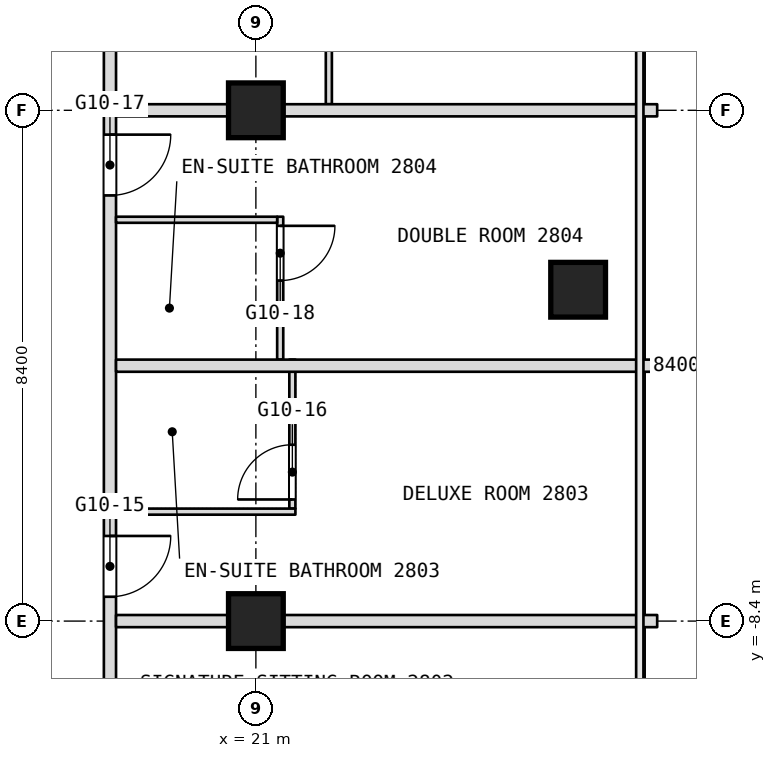
"""IFC4 building model, lengths in metres.
Left out: names, types, materials, properties, quantities, classifications, styles, units other than length and angle.
Written with IfcOpenShell. Run it as: python <this file> out.ifc"""

import sys

from ifc_helpers import new_model, si_unit, direction, frame, frame_2d, origin, origin_2d, place, context, subcontext, project, spatial, rectangle, extrude, element, fill, save


model = new_model("IFC4")
c1 = context("Model", 3, precision=1e-05, world=origin(), true_north=direction((0.0, 1.0)))
c2 = subcontext(c1, "Body", "Model", "MODEL_VIEW")
j1 = project(units=[si_unit("LENGTHUNIT", "METRE"), si_unit("PLANEANGLEUNIT", "RADIAN")], contexts=[c1])
p1 = place(None, origin())
s1 = spatial("IfcSite", under=j1, at=p1, CompositionType="ELEMENT")
p2 = place(p1, origin())
s2 = spatial("IfcBuilding", under=s1, at=p2, CompositionType="ELEMENT")
p3 = place(p2, frame((0.0, 0.0, 126.5)))
s3 = spatial("IfcBuildingStorey", under=s2, at=p3, CompositionType="ELEMENT", Elevation=126.5)
for number, where, z_axis, x_axis in (
    (1, (21.0, -8.4, 0.0), (0.0, 0.0, 1.0), (1.0, 0.0, 0.0)),
    (2, (21.0, 0.0, 0.0), (0.0, 0.0, 1.0), (1.0, 0.0, 0.0)),
    (3, (26.3, -2.951, 0.0), (0.0, 0.0, 1.0), (1.0, 0.0, 0.0)),
):
    element("IfcColumn", number, at=place(p3, frame(where, z_axis=z_axis, x_axis=x_axis)), inside=s3, PredefinedType="COLUMN", context=c2, shape_type="SweptSolid", body=[
        extrude(rectangle(XDim=0.9, YDim=0.9, at=origin_2d()), origin(), (0.0, 0.0, 1.0), 3.6),
    ])
p4 = place(p3, frame((22.2, 0.1, 0.0), z_axis=(0.0, 0.0, 1.0), x_axis=(0.0, 1.0, 0.0)))
e4 = element("IfcWall", 4, at=p4, inside=s3, PredefinedType="PARTITIONING", context=c2, shape_type="SweptSolid", body=[
    extrude(rectangle(XDim=3.55, YDim=0.1, at=frame_2d((1.775, 0.0))), origin(), (0.0, 0.0, 1.0), 3.34),
])
p5 = place(p4, frame((2.5, 0.0, 0.0)))
e5 = element("IfcOpeningElement", 5, at=p5, cuts=e4, PredefinedType="OPENING", context=c2, shape_type="SweptSolid", body=[
    extrude(rectangle(XDim=0.9, YDim=2.1, at=frame_2d((0.45, 1.05))), frame((0.0, 0.05, 0.0), z_axis=(0.0, -1.0, 0.0), x_axis=(1.0, 0.0, 0.0)), (0.0, 0.0, 1.0), 0.1),
])
p6 = place(p3, frame((21.6, -6.55, 0.0), z_axis=(0.0, 0.0, 1.0), x_axis=(0.0, 1.0, 0.0)))
e6 = element("IfcWall", 6, at=p6, inside=s3, PredefinedType="PARTITIONING", context=c2, shape_type="SweptSolid", body=[
    extrude(rectangle(XDim=2.45, YDim=0.1, at=frame_2d((1.225, 0.0))), origin(), (0.0, 0.0, 1.0), 3.34),
])
p7 = place(p6, frame((0.15, 0.0, 0.0)))
e7 = element("IfcOpeningElement", 7, at=p7, cuts=e6, PredefinedType="OPENING", context=c2, shape_type="SweptSolid", body=[
    extrude(rectangle(XDim=0.9, YDim=2.1, at=frame_2d((0.45, 1.05))), frame((0.0, 0.05, 0.0), z_axis=(0.0, -1.0, 0.0), x_axis=(1.0, 0.0, 0.0)), (0.0, 0.0, 1.0), 0.1),
])
p8 = place(p3, frame((21.4, -4.1, 0.0), z_axis=(0.0, 0.0, 1.0), x_axis=(0.0, 1.0, 0.0)))
e8 = element("IfcWall", 8, at=p8, inside=s3, PredefinedType="PARTITIONING", context=c2, shape_type="SweptSolid", body=[
    extrude(rectangle(XDim=2.35, YDim=0.1, at=frame_2d((1.175, 0.0))), origin(), (0.0, 0.0, 1.0), 3.34),
])
p9 = place(p8, frame((1.3, 0.0, 0.0)))
e9 = element("IfcOpeningElement", 9, at=p9, cuts=e8, PredefinedType="OPENING", context=c2, shape_type="SweptSolid", body=[
    extrude(rectangle(XDim=0.9, YDim=2.1, at=frame_2d((0.45, 1.05))), frame((0.0, 0.05, 0.0), z_axis=(0.0, -1.0, 0.0), x_axis=(1.0, 0.0, 0.0)), (0.0, 0.0, 1.0), 0.1),
])
p10 = place(p3, frame((18.6, -21.708, 0.0), z_axis=(0.0, 0.0, 1.0), x_axis=(0.0, 1.0, 0.0)))
e10 = element("IfcWall", 10, at=p10, inside=s3, PredefinedType="PARTITIONING", context=c2, shape_type="SweptSolid", body=[
    extrude(rectangle(XDim=49.648, YDim=0.2, at=frame_2d((24.824, 0.0))), origin(), (0.0, 0.0, 1.0), 3.34),
])
p11 = place(p10, frame((2.204, 0.0, 0.0)))
e11 = element("IfcOpeningElement", 11, at=p11, cuts=e10, PredefinedType="OPENING", context=c2, shape_type="SweptSolid", body=[
    extrude(rectangle(XDim=0.9, YDim=2.1, at=frame_2d((0.45, 1.05))), frame((0.0, 0.1, 0.0), z_axis=(0.0, -1.0, 0.0), x_axis=(1.0, 0.0, 0.0)), (0.0, 0.0, 1.0), 0.2),
])
p12 = place(p10, frame((10.658, 0.0, 0.0)))
e12 = element("IfcOpeningElement", 12, at=p12, cuts=e10, PredefinedType="OPENING", context=c2, shape_type="SweptSolid", body=[
    extrude(rectangle(XDim=1.1, YDim=2.1, at=frame_2d((0.55, 1.05))), frame((0.0, 0.1, 0.0), z_axis=(0.0, -1.0, 0.0), x_axis=(1.0, 0.0, 0.0)), (0.0, 0.0, 1.0), 0.2),
])
p13 = place(p10, frame((13.708, 0.0, 0.0)))
e13 = element("IfcOpeningElement", 13, at=p13, cuts=e10, PredefinedType="OPENING", context=c2, shape_type="SweptSolid", body=[
    extrude(rectangle(XDim=1.0, YDim=2.1, at=frame_2d((0.5, 1.05))), frame((0.0, 0.1, 0.0), z_axis=(0.0, -1.0, 0.0), x_axis=(1.0, 0.0, 0.0)), (0.0, 0.0, 1.0), 0.2),
])
p14 = place(p10, frame((20.308, 0.0, 0.0)))
e14 = element("IfcOpeningElement", 14, at=p14, cuts=e10, PredefinedType="OPENING", context=c2, shape_type="SweptSolid", body=[
    extrude(rectangle(XDim=1.0, YDim=2.1, at=frame_2d((0.5, 1.05))), frame((0.0, 0.1, 0.0), z_axis=(0.0, -1.0, 0.0), x_axis=(1.0, 0.0, 0.0)), (0.0, 0.0, 1.0), 0.2),
])
p15 = place(p10, frame((25.408, 0.0, 0.0)))
e15 = element("IfcOpeningElement", 15, at=p15, cuts=e10, PredefinedType="OPENING", context=c2, shape_type="SweptSolid", body=[
    extrude(rectangle(XDim=1.1, YDim=2.1, at=frame_2d((0.55, 1.05))), frame((0.0, 0.1, 0.0), z_axis=(0.0, -1.0, 0.0), x_axis=(1.0, 0.0, 0.0)), (0.0, 0.0, 1.0), 0.2),
])
p16 = place(p10, frame((30.508, 0.0, 0.0)))
e16 = element("IfcOpeningElement", 16, at=p16, cuts=e10, PredefinedType="OPENING", context=c2, shape_type="SweptSolid", body=[
    extrude(rectangle(XDim=1.0, YDim=2.1, at=frame_2d((0.5, 1.05))), frame((0.0, 0.1, 0.0), z_axis=(0.0, -1.0, 0.0), x_axis=(1.0, 0.0, 0.0)), (0.0, 0.0, 1.0), 0.2),
])
p17 = place(p10, frame((37.108, 0.0, 0.0)))
e17 = element("IfcOpeningElement", 17, at=p17, cuts=e10, PredefinedType="OPENING", context=c2, shape_type="SweptSolid", body=[
    extrude(rectangle(XDim=1.0, YDim=2.1, at=frame_2d((0.5, 1.05))), frame((0.0, 0.1, 0.0), z_axis=(0.0, -1.0, 0.0), x_axis=(1.0, 0.0, 0.0)), (0.0, 0.0, 1.0), 0.2),
])
p18 = place(p10, frame((42.608, 0.0, 0.0)))
e18 = element("IfcOpeningElement", 18, at=p18, cuts=e10, PredefinedType="OPENING", context=c2, shape_type="SweptSolid", body=[
    extrude(rectangle(XDim=1.0, YDim=2.1, at=frame_2d((0.5, 1.05))), frame((0.0, 0.1, 0.0), z_axis=(0.0, -1.0, 0.0), x_axis=(1.0, 0.0, 0.0)), (0.0, 0.0, 1.0), 0.2),
])
p19 = place(p10, frame((44.608, 0.0, 0.0)))
e19 = element("IfcOpeningElement", 19, at=p19, cuts=e10, PredefinedType="OPENING", context=c2, shape_type="SweptSolid", body=[
    extrude(rectangle(XDim=1.0, YDim=2.1, at=frame_2d((0.5, 1.05))), frame((0.0, 0.1, 0.0), z_axis=(0.0, -1.0, 0.0), x_axis=(1.0, 0.0, 0.0)), (0.0, 0.0, 1.0), 0.2),
])
p20 = place(p3, frame((18.7, -8.4, 0.0), z_axis=(0.0, 0.0, 1.0), x_axis=(1.0, 0.0, 0.0)))
e20 = element("IfcWall", 20, at=p20, inside=s3, PredefinedType="PARTITIONING", context=c2, shape_type="SweptSolid", body=[
    extrude(rectangle(XDim=8.9, YDim=0.2, at=frame_2d((4.45, 0.0))), origin(), (0.0, 0.0, 1.0), 2.89),
])
p21 = place(p3, frame((18.7, -6.6, 0.0), z_axis=(0.0, 0.0, 1.0), x_axis=(1.0, 0.0, 0.0)))
e21 = element("IfcWall", 21, at=p21, inside=s3, PredefinedType="PARTITIONING", context=c2, shape_type="SweptSolid", body=[
    extrude(rectangle(XDim=2.95, YDim=0.1, at=frame_2d((1.475, 0.0))), origin(), (0.0, 0.0, 1.0), 3.34),
])
p22 = place(p3, frame((18.7, -4.2, 0.0), z_axis=(0.0, 0.0, 1.0), x_axis=(1.0, 0.0, 0.0)))
e22 = element("IfcWall", 22, at=p22, inside=s3, PredefinedType="PARTITIONING", context=c2, shape_type="SweptSolid", body=[
    extrude(rectangle(XDim=8.9, YDim=0.2, at=frame_2d((4.45, 0.0))), origin(), (0.0, 0.0, 1.0), 3.34),
])
p23 = place(p3, frame((18.7, -1.8, 0.0), z_axis=(0.0, 0.0, 1.0), x_axis=(1.0, 0.0, 0.0)))
e23 = element("IfcWall", 23, at=p23, inside=s3, PredefinedType="PARTITIONING", context=c2, shape_type="SweptSolid", body=[
    extrude(rectangle(XDim=2.65, YDim=0.1, at=frame_2d((1.325, 0.0))), origin(), (0.0, 0.0, 1.0), 3.34),
])
p24 = place(p3, frame((18.7, 0.0, 0.0), z_axis=(0.0, 0.0, 1.0), x_axis=(1.0, 0.0, 0.0)))
e24 = element("IfcWall", 24, at=p24, inside=s3, PredefinedType="PARTITIONING", context=c2, shape_type="SweptSolid", body=[
    extrude(rectangle(XDim=8.9, YDim=0.2, at=frame_2d((4.45, 0.0))), origin(), (0.0, 0.0, 1.0), 2.89),
])
p25 = place(p7, origin())
e25 = element("IfcDoor", 25, at=p25, inside=s3, OperationType="SINGLE_SWING_LEFT", PredefinedType="DOOR", context=c2, shape_type="SweptSolid", body=[
    extrude(rectangle(XDim=0.9, YDim=2.1, at=frame_2d((0.45, 1.05))), frame((0.0, 0.025, 0.0), z_axis=(0.0, -1.0, 0.0), x_axis=(1.0, 0.0, 0.0)), (0.0, 0.0, 1.0), 0.05),
])
fill(e7, e25)
p26 = place(p9, origin())
e26 = element("IfcDoor", 26, at=p26, inside=s3, OperationType="SINGLE_SWING_RIGHT", PredefinedType="DOOR", context=c2, shape_type="SweptSolid", body=[
    extrude(rectangle(XDim=0.9, YDim=2.1, at=frame_2d((0.45, 1.05))), frame((0.0, 0.025, 0.0), z_axis=(0.0, -1.0, 0.0), x_axis=(1.0, 0.0, 0.0)), (0.0, 0.0, 1.0), 0.05),
])
fill(e9, e26)
p27 = place(p13, origin())
e27 = element("IfcDoor", 27, at=p27, inside=s3, OperationType="SINGLE_SWING_LEFT", PredefinedType="DOOR", context=c2, shape_type="SweptSolid", body=[
    extrude(rectangle(XDim=1.0, YDim=2.1, at=frame_2d((0.5, 1.05))), frame((0.0, 0.025, 0.0), z_axis=(0.0, -1.0, 0.0), x_axis=(1.0, 0.0, 0.0)), (0.0, 0.0, 1.0), 0.05),
])
fill(e13, e27)
p28 = place(p14, origin())
e28 = element("IfcDoor", 28, at=p28, inside=s3, OperationType="SINGLE_SWING_LEFT", PredefinedType="DOOR", context=c2, shape_type="SweptSolid", body=[
    extrude(rectangle(XDim=1.0, YDim=2.1, at=frame_2d((0.5, 1.05))), frame((0.0, 0.025, 0.0), z_axis=(0.0, -1.0, 0.0), x_axis=(1.0, 0.0, 0.0)), (0.0, 0.0, 1.0), 0.05),
])
fill(e14, e28)
save(model, sys.argv[1])
